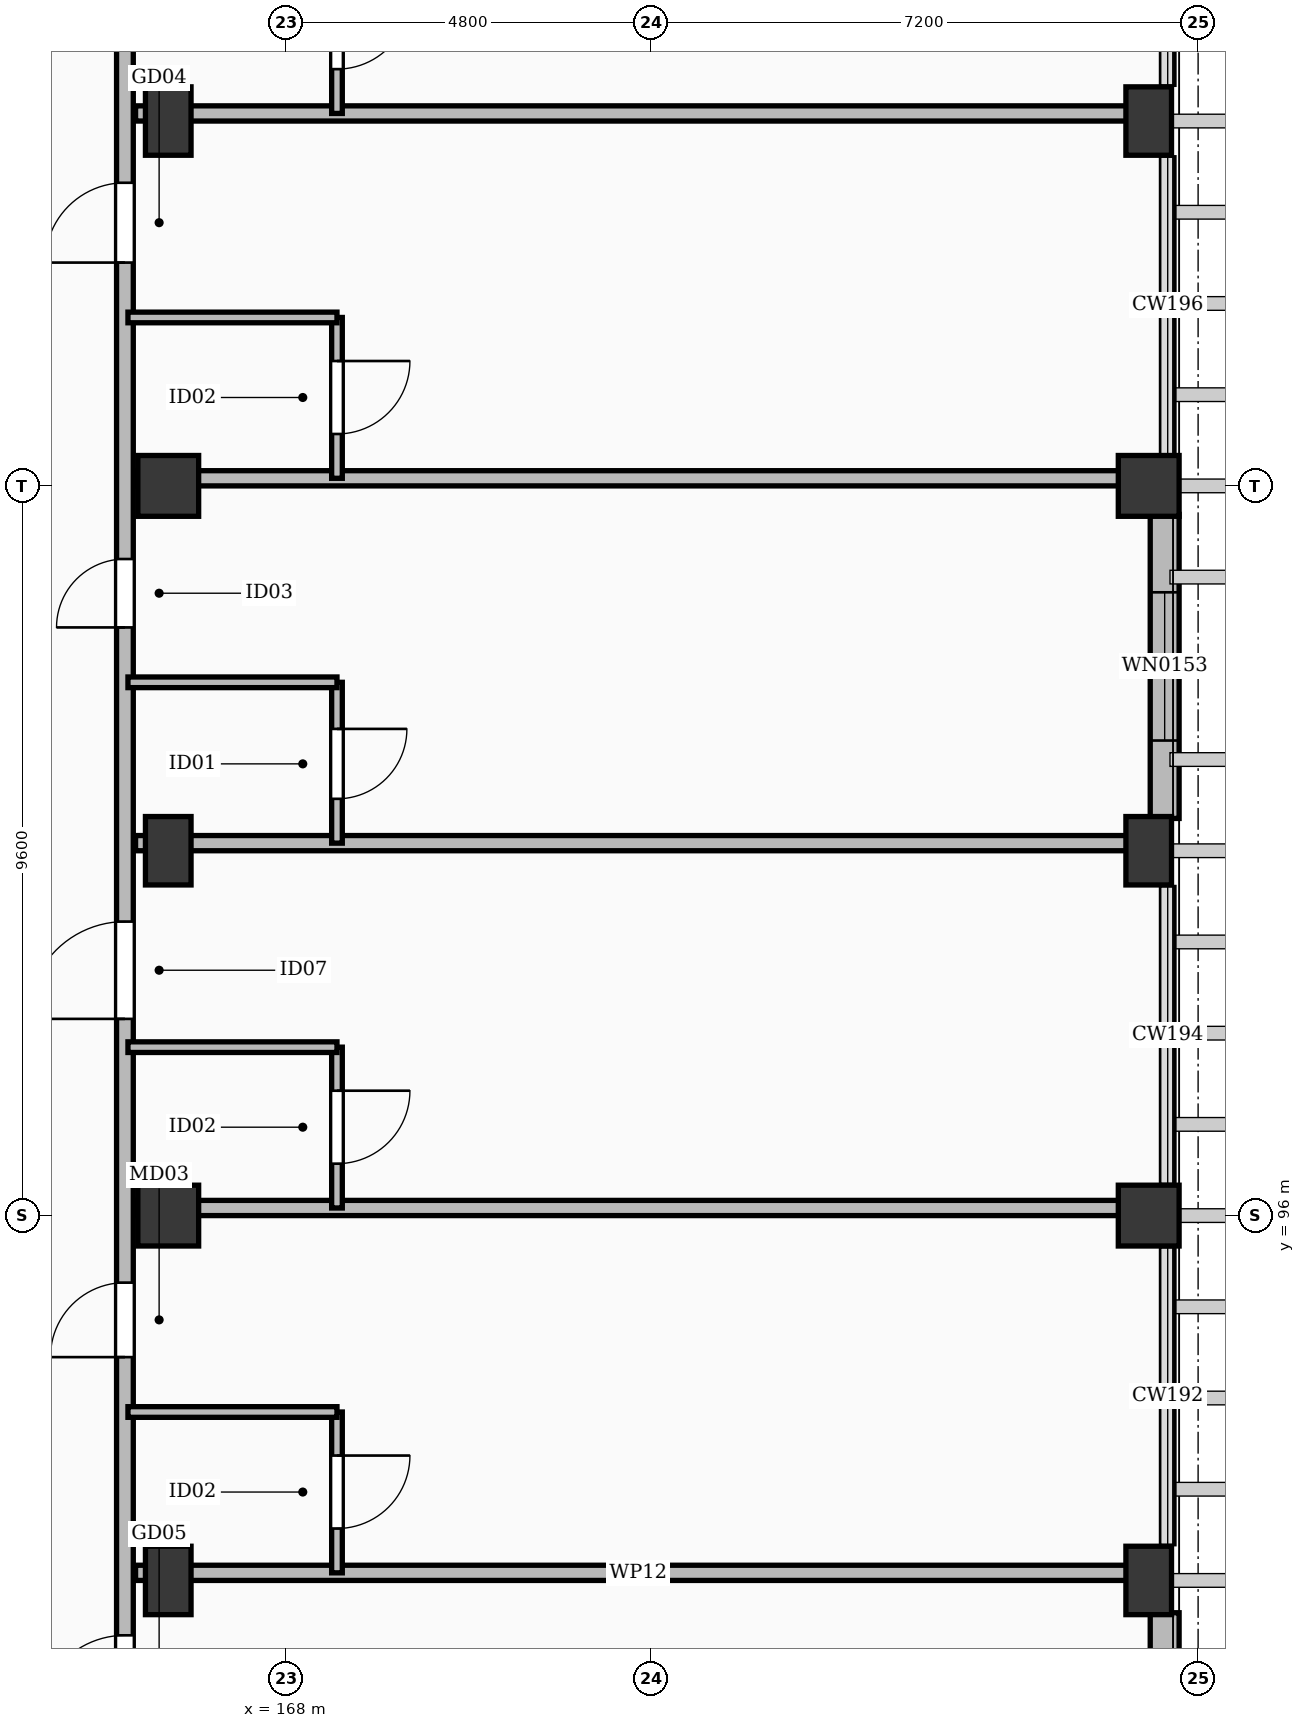
"""IFC4 building model, lengths in metres.
Left out: names, types, materials, properties, quantities, classifications, styles, units other than length and angle.
Written with IfcOpenShell. Run it as: python <this file> out.ifc"""

import sys

from ifc_helpers import new_model, si_unit, direction, frame, frame_2d, origin, origin_2d, place, context, subcontext, project, spatial, rectangle, extrude, element, fill, save


model = new_model("IFC4")
c1 = context("Model", 3, precision=1e-05, world=origin(), true_north=direction((0.0, 1.0)))
c2 = subcontext(c1, "Body", "Model", "MODEL_VIEW")
j1 = project(units=[si_unit("LENGTHUNIT", "METRE"), si_unit("PLANEANGLEUNIT", "RADIAN")], contexts=[c1])
p1 = place(None, origin())
s1 = spatial("IfcSite", under=j1, at=p1, CompositionType="ELEMENT")
p2 = place(p1, origin())
s2 = spatial("IfcBuilding", under=s1, at=p2, CompositionType="ELEMENT")
p3 = place(p2, frame((0.0, 0.0, 21.0)))
s3 = spatial("IfcBuildingStorey", under=s2, at=p3, CompositionType="ELEMENT", Elevation=21.0)
for number, where, z_axis, x_axis in (
    (1, (166.45, 96.0, 0.0), (0.0, 0.0, 1.0), (1.0, 0.0, 0.0)),
    (2, (166.45, 105.6, 0.0), (0.0, 0.0, 1.0), (1.0, 0.0, 0.0)),
    (3, (179.35, 96.0, 0.0), (0.0, 0.0, 1.0), (1.0, 0.0, 0.0)),
    (4, (179.35, 105.6, 0.0), (0.0, 0.0, 1.0), (1.0, 0.0, 0.0)),
):
    element("IfcColumn", number, at=place(p3, frame(where, z_axis=z_axis, x_axis=x_axis)), inside=s3, PredefinedType="COLUMN", context=c2, shape_type="SweptSolid", body=[
        extrude(rectangle(XDim=0.8, YDim=0.8, at=origin_2d()), origin(), (0.0, 0.0, 1.0), 3.6),
    ])
for number, where, z_axis, x_axis in (
    (5, (166.45, 91.2, -0.26), (0.0, 0.0, 1.0), (1.0, 0.0, 0.0)),
    (6, (166.45, 100.8, -0.26), (0.0, 0.0, 1.0), (1.0, 0.0, 0.0)),
    (7, (166.45, 110.4, -0.26), (0.0, 0.0, 1.0), (1.0, 0.0, 0.0)),
    (8, (179.35, 91.2, -0.26), (0.0, 0.0, 1.0), (1.0, 0.0, 0.0)),
    (9, (179.35, 100.8, -0.26), (0.0, 0.0, 1.0), (1.0, 0.0, 0.0)),
    (10, (179.35, 110.4, -0.26), (0.0, 0.0, 1.0), (1.0, 0.0, 0.0)),
):
    element("IfcColumn", number, at=place(p3, frame(where, z_axis=z_axis, x_axis=x_axis)), inside=s3, PredefinedType="COLUMN", context=c2, shape_type="SweptSolid", body=[
        extrude(rectangle(XDim=0.6, YDim=0.9, at=origin_2d()), origin(), (0.0, 0.0, 1.0), 3.86),
    ])
p4 = place(p3, frame((179.56, 90.775, 0.0), z_axis=(0.0, 0.0, 1.0), x_axis=(0.0, -1.0, 0.0)))
e11 = element("IfcWall", 11, at=p4, inside=s3, PredefinedType="SOLIDWALL", context=c2, shape_type="SweptSolid", body=[
    extrude(rectangle(XDim=4.0, YDim=0.38, at=frame_2d((2.0, 0.0))), origin(), (0.0, 0.0, 1.0), 2.582),
])
p5 = place(p4, frame((0.8, 0.0, 0.55)))
e12 = element("IfcOpeningElement", 12, at=p5, cuts=e11, PredefinedType="OPENING", context=c2, shape_type="SweptSolid", body=[
    extrude(rectangle(XDim=2.4, YDim=1.8, at=frame_2d((1.2, 0.9))), frame((0.0, 0.202, 0.0), z_axis=(0.0, -1.0, 0.0), x_axis=(1.0, 0.0, 0.0)), (0.0, 0.0, 1.0), 0.404),
])
p6 = place(p3, frame((179.56, 105.225, 0.0), z_axis=(0.0, 0.0, 1.0), x_axis=(0.0, -1.0, 0.0)))
e13 = element("IfcWall", 13, at=p6, inside=s3, PredefinedType="SOLIDWALL", context=c2, shape_type="SweptSolid", body=[
    extrude(rectangle(XDim=4.0, YDim=0.38, at=frame_2d((2.0, 0.0))), origin(), (0.0, 0.0, 1.0), 2.582),
])
p7 = place(p6, frame((1.025, 0.0, 0.55)))
e14 = element("IfcOpeningElement", 14, at=p7, cuts=e13, PredefinedType="OPENING", context=c2, shape_type="SweptSolid", body=[
    extrude(rectangle(XDim=1.95, YDim=1.77, at=frame_2d((0.975, 0.885))), frame((0.0, 0.202, 0.0), z_axis=(0.0, -1.0, 0.0), x_axis=(1.0, 0.0, 0.0)), (0.0, 0.0, 1.0), 0.404),
])
p8 = place(p3, frame((165.88, 65.4, 0.0), z_axis=(0.0, 0.0, 1.0), x_axis=(0.0, 1.0, 0.0)))
e15 = element("IfcWall", 15, at=p8, inside=s3, PredefinedType="PARTITIONING", context=c2, shape_type="SweptSolid", body=[
    extrude(rectangle(XDim=60.25, YDim=0.22, at=frame_2d((30.125, 0.0))), origin(), (0.0, 0.0, 1.0), 2.582),
])
p9 = place(p8, frame((4.388, 0.0, 0.0)))
e16 = element("IfcOpeningElement", 16, at=p9, cuts=e15, PredefinedType="OPENING", context=c2, shape_type="SweptSolid", body=[
    extrude(rectangle(XDim=1.28, YDim=2.16, at=frame_2d((0.64, 1.08))), frame((0.0, 0.122, 0.0), z_axis=(0.0, -1.0, 0.0), x_axis=(1.0, 0.0, 0.0)), (0.0, 0.0, 1.0), 0.244),
])
p10 = place(p8, frame((9.538, 0.0, 0.0)))
e17 = element("IfcOpeningElement", 17, at=p10, cuts=e15, PredefinedType="OPENING", context=c2, shape_type="SweptSolid", body=[
    extrude(rectangle(XDim=0.9, YDim=2.08, at=frame_2d((0.45, 1.04))), frame((0.0, 0.122, 0.0), z_axis=(0.0, -1.0, 0.0), x_axis=(1.0, 0.0, 0.0)), (0.0, 0.0, 1.0), 0.244),
])
p11 = place(p8, frame((14.338, 0.0, 0.0)))
e18 = element("IfcOpeningElement", 18, at=p11, cuts=e15, PredefinedType="OPENING", context=c2, shape_type="SweptSolid", body=[
    extrude(rectangle(XDim=1.05, YDim=2.22, at=frame_2d((0.525, 1.11))), frame((0.0, 0.122, 0.0), z_axis=(0.0, -1.0, 0.0), x_axis=(1.0, 0.0, 0.0)), (0.0, 0.0, 1.0), 0.244),
])
p12 = place(p8, frame((19.138, 0.0, 0.0)))
e19 = element("IfcOpeningElement", 19, at=p12, cuts=e15, PredefinedType="OPENING", context=c2, shape_type="SweptSolid", body=[
    extrude(rectangle(XDim=1.02, YDim=2.2, at=frame_2d((0.51, 1.1))), frame((0.0, 0.122, 0.0), z_axis=(0.0, -1.0, 0.0), x_axis=(1.0, 0.0, 0.0)), (0.0, 0.0, 1.0), 0.244),
])
p13 = place(p8, frame((23.938, 0.0, 0.0)))
e20 = element("IfcOpeningElement", 20, at=p13, cuts=e15, PredefinedType="OPENING", context=c2, shape_type="SweptSolid", body=[
    extrude(rectangle(XDim=1.14, YDim=2.26, at=frame_2d((0.57, 1.13))), frame((0.0, 0.122, 0.0), z_axis=(0.0, -1.0, 0.0), x_axis=(1.0, 0.0, 0.0)), (0.0, 0.0, 1.0), 0.244),
])
p14 = place(p8, frame((28.738, 0.0, 0.0)))
e21 = element("IfcOpeningElement", 21, at=p14, cuts=e15, PredefinedType="OPENING", context=c2, shape_type="SweptSolid", body=[
    extrude(rectangle(XDim=0.98, YDim=2.15, at=frame_2d((0.49, 1.075))), frame((0.0, 0.122, 0.0), z_axis=(0.0, -1.0, 0.0), x_axis=(1.0, 0.0, 0.0)), (0.0, 0.0, 1.0), 0.244),
])
p15 = place(p8, frame((33.188, 0.0, 0.0)))
e22 = element("IfcOpeningElement", 22, at=p15, cuts=e15, PredefinedType="OPENING", context=c2, shape_type="SweptSolid", body=[
    extrude(rectangle(XDim=1.28, YDim=2.16, at=frame_2d((0.64, 1.08))), frame((0.0, 0.122, 0.0), z_axis=(0.0, -1.0, 0.0), x_axis=(1.0, 0.0, 0.0)), (0.0, 0.0, 1.0), 0.244),
])
p16 = place(p8, frame((38.338, 0.0, 0.0)))
e23 = element("IfcOpeningElement", 23, at=p16, cuts=e15, PredefinedType="OPENING", context=c2, shape_type="SweptSolid", body=[
    extrude(rectangle(XDim=0.9, YDim=2.08, at=frame_2d((0.45, 1.04))), frame((0.0, 0.122, 0.0), z_axis=(0.0, -1.0, 0.0), x_axis=(1.0, 0.0, 0.0)), (0.0, 0.0, 1.0), 0.244),
])
p17 = place(p8, frame((43.138, 0.0, 0.0)))
e24 = element("IfcOpeningElement", 24, at=p17, cuts=e15, PredefinedType="OPENING", context=c2, shape_type="SweptSolid", body=[
    extrude(rectangle(XDim=1.05, YDim=2.22, at=frame_2d((0.525, 1.11))), frame((0.0, 0.122, 0.0), z_axis=(0.0, -1.0, 0.0), x_axis=(1.0, 0.0, 0.0)), (0.0, 0.0, 1.0), 0.244),
])
p18 = place(p8, frame((47.938, 0.0, 0.0)))
e25 = element("IfcOpeningElement", 25, at=p18, cuts=e15, PredefinedType="OPENING", context=c2, shape_type="SweptSolid", body=[
    extrude(rectangle(XDim=1.02, YDim=2.2, at=frame_2d((0.51, 1.1))), frame((0.0, 0.122, 0.0), z_axis=(0.0, -1.0, 0.0), x_axis=(1.0, 0.0, 0.0)), (0.0, 0.0, 1.0), 0.244),
])
p19 = place(p8, frame((52.738, 0.0, 0.0)))
e26 = element("IfcOpeningElement", 26, at=p19, cuts=e15, PredefinedType="OPENING", context=c2, shape_type="SweptSolid", body=[
    extrude(rectangle(XDim=1.14, YDim=2.26, at=frame_2d((0.57, 1.13))), frame((0.0, 0.122, 0.0), z_axis=(0.0, -1.0, 0.0), x_axis=(1.0, 0.0, 0.0)), (0.0, 0.0, 1.0), 0.244),
])
p20 = place(p8, frame((57.538, 0.0, 0.0)))
e27 = element("IfcOpeningElement", 27, at=p20, cuts=e15, PredefinedType="OPENING", context=c2, shape_type="SweptSolid", body=[
    extrude(rectangle(XDim=0.98, YDim=2.15, at=frame_2d((0.49, 1.075))), frame((0.0, 0.122, 0.0), z_axis=(0.0, -1.0, 0.0), x_axis=(1.0, 0.0, 0.0)), (0.0, 0.0, 1.0), 0.244),
])
p21 = place(p3, frame((166.02, 91.3, 0.0), z_axis=(0.0, 0.0, 1.0), x_axis=(1.0, 0.0, 0.0)))
e28 = element("IfcWall", 28, at=p21, inside=s3, PredefinedType="PARTITIONING", context=c2, shape_type="SweptSolid", body=[
    extrude(rectangle(XDim=13.23, YDim=0.2, at=frame_2d((6.615, 0.0))), origin(), (0.0, 0.0, 1.0), 2.582),
])
p22 = place(p3, frame((168.67, 91.3, 0.0), z_axis=(0.0, 0.0, 1.0), x_axis=(0.0, 1.0, 0.0)))
e29 = element("IfcWall", 29, at=p22, inside=s3, PredefinedType="PARTITIONING", context=c2, shape_type="SweptSolid", body=[
    extrude(rectangle(XDim=2.116, YDim=0.14, at=frame_2d((1.058, 0.0))), origin(), (0.0, 0.0, 1.0), 2.652),
])
p23 = place(p22, frame((0.583, 0.0, 0.0)))
e30 = element("IfcOpeningElement", 30, at=p23, cuts=e29, PredefinedType="OPENING", context=c2, shape_type="SweptSolid", body=[
    extrude(rectangle(XDim=0.96, YDim=2.12, at=frame_2d((0.48, 1.06))), frame((0.0, 0.082, 0.0), z_axis=(0.0, -1.0, 0.0), x_axis=(1.0, 0.0, 0.0)), (0.0, 0.0, 1.0), 0.164),
])
p24 = place(p3, frame((165.92, 93.416, 0.0), z_axis=(0.0, 0.0, 1.0), x_axis=(1.0, 0.0, 0.0)))
e31 = element("IfcWall", 31, at=p24, inside=s3, PredefinedType="PARTITIONING", context=c2, shape_type="SweptSolid", body=[
    extrude(rectangle(XDim=2.75, YDim=0.14, at=frame_2d((1.375, 0.0))), origin(), (0.0, 0.0, 1.0), 2.652),
])
p25 = place(p3, frame((166.02, 96.1, 0.0), z_axis=(0.0, 0.0, 1.0), x_axis=(1.0, 0.0, 0.0)))
e32 = element("IfcWall", 32, at=p25, inside=s3, PredefinedType="PARTITIONING", context=c2, shape_type="SweptSolid", body=[
    extrude(rectangle(XDim=13.23, YDim=0.2, at=frame_2d((6.615, 0.0))), origin(), (0.0, 0.0, 1.0), 2.582),
])
p26 = place(p3, frame((168.67, 96.1, 0.0), z_axis=(0.0, 0.0, 1.0), x_axis=(0.0, 1.0, 0.0)))
e33 = element("IfcWall", 33, at=p26, inside=s3, PredefinedType="PARTITIONING", context=c2, shape_type="SweptSolid", body=[
    extrude(rectangle(XDim=2.116, YDim=0.14, at=frame_2d((1.058, 0.0))), origin(), (0.0, 0.0, 1.0), 2.652),
])
p27 = place(p26, frame((0.583, 0.0, 0.0)))
e34 = element("IfcOpeningElement", 34, at=p27, cuts=e33, PredefinedType="OPENING", context=c2, shape_type="SweptSolid", body=[
    extrude(rectangle(XDim=0.96, YDim=2.12, at=frame_2d((0.48, 1.06))), frame((0.0, 0.082, 0.0), z_axis=(0.0, -1.0, 0.0), x_axis=(1.0, 0.0, 0.0)), (0.0, 0.0, 1.0), 0.164),
])
p28 = place(p3, frame((165.92, 98.216, 0.0), z_axis=(0.0, 0.0, 1.0), x_axis=(1.0, 0.0, 0.0)))
e35 = element("IfcWall", 35, at=p28, inside=s3, PredefinedType="PARTITIONING", context=c2, shape_type="SweptSolid", body=[
    extrude(rectangle(XDim=2.75, YDim=0.14, at=frame_2d((1.375, 0.0))), origin(), (0.0, 0.0, 1.0), 2.652),
])
p29 = place(p3, frame((166.02, 100.9, 0.0), z_axis=(0.0, 0.0, 1.0), x_axis=(1.0, 0.0, 0.0)))
e36 = element("IfcWall", 36, at=p29, inside=s3, PredefinedType="PARTITIONING", context=c2, shape_type="SweptSolid", body=[
    extrude(rectangle(XDim=13.23, YDim=0.2, at=frame_2d((6.615, 0.0))), origin(), (0.0, 0.0, 1.0), 2.582),
])
p30 = place(p3, frame((168.67, 100.9, 0.0), z_axis=(0.0, 0.0, 1.0), x_axis=(0.0, 1.0, 0.0)))
e37 = element("IfcWall", 37, at=p30, inside=s3, PredefinedType="PARTITIONING", context=c2, shape_type="SweptSolid", body=[
    extrude(rectangle(XDim=2.116, YDim=0.14, at=frame_2d((1.058, 0.0))), origin(), (0.0, 0.0, 1.0), 2.652),
])
p31 = place(p30, frame((0.583, 0.0, 0.0)))
e38 = element("IfcOpeningElement", 38, at=p31, cuts=e37, PredefinedType="OPENING", context=c2, shape_type="SweptSolid", body=[
    extrude(rectangle(XDim=0.92, YDim=2.1, at=frame_2d((0.46, 1.05))), frame((0.0, 0.082, 0.0), z_axis=(0.0, -1.0, 0.0), x_axis=(1.0, 0.0, 0.0)), (0.0, 0.0, 1.0), 0.164),
])
p32 = place(p3, frame((165.92, 103.016, 0.0), z_axis=(0.0, 0.0, 1.0), x_axis=(1.0, 0.0, 0.0)))
e39 = element("IfcWall", 39, at=p32, inside=s3, PredefinedType="PARTITIONING", context=c2, shape_type="SweptSolid", body=[
    extrude(rectangle(XDim=2.75, YDim=0.14, at=frame_2d((1.375, 0.0))), origin(), (0.0, 0.0, 1.0), 2.652),
])
p33 = place(p3, frame((166.02, 105.7, 0.0), z_axis=(0.0, 0.0, 1.0), x_axis=(1.0, 0.0, 0.0)))
e40 = element("IfcWall", 40, at=p33, inside=s3, PredefinedType="PARTITIONING", context=c2, shape_type="SweptSolid", body=[
    extrude(rectangle(XDim=13.23, YDim=0.2, at=frame_2d((6.615, 0.0))), origin(), (0.0, 0.0, 1.0), 2.582),
])
p34 = place(p3, frame((168.67, 105.7, 0.0), z_axis=(0.0, 0.0, 1.0), x_axis=(0.0, 1.0, 0.0)))
e41 = element("IfcWall", 41, at=p34, inside=s3, PredefinedType="PARTITIONING", context=c2, shape_type="SweptSolid", body=[
    extrude(rectangle(XDim=2.116, YDim=0.14, at=frame_2d((1.058, 0.0))), origin(), (0.0, 0.0, 1.0), 2.652),
])
p35 = place(p34, frame((0.583, 0.0, 0.0)))
e42 = element("IfcOpeningElement", 42, at=p35, cuts=e41, PredefinedType="OPENING", context=c2, shape_type="SweptSolid", body=[
    extrude(rectangle(XDim=0.96, YDim=2.12, at=frame_2d((0.48, 1.06))), frame((0.0, 0.082, 0.0), z_axis=(0.0, -1.0, 0.0), x_axis=(1.0, 0.0, 0.0)), (0.0, 0.0, 1.0), 0.164),
])
p36 = place(p3, frame((165.92, 107.816, 0.0), z_axis=(0.0, 0.0, 1.0), x_axis=(1.0, 0.0, 0.0)))
e43 = element("IfcWall", 43, at=p36, inside=s3, PredefinedType="PARTITIONING", context=c2, shape_type="SweptSolid", body=[
    extrude(rectangle(XDim=2.75, YDim=0.14, at=frame_2d((1.375, 0.0))), origin(), (0.0, 0.0, 1.0), 2.652),
])
p37 = place(p3, frame((166.02, 110.5, 0.0), z_axis=(0.0, 0.0, 1.0), x_axis=(1.0, 0.0, 0.0)))
e44 = element("IfcWall", 44, at=p37, inside=s3, PredefinedType="PARTITIONING", context=c2, shape_type="SweptSolid", body=[
    extrude(rectangle(XDim=13.23, YDim=0.2, at=frame_2d((6.615, 0.0))), origin(), (0.0, 0.0, 1.0), 2.582),
])
p38 = place(p3, frame((168.67, 110.5, 0.0), z_axis=(0.0, 0.0, 1.0), x_axis=(0.0, 1.0, 0.0)))
e45 = element("IfcWall", 45, at=p38, inside=s3, PredefinedType="PARTITIONING", context=c2, shape_type="SweptSolid", body=[
    extrude(rectangle(XDim=2.116, YDim=0.14, at=frame_2d((1.058, 0.0))), origin(), (0.0, 0.0, 1.0), 2.652),
])
p39 = place(p38, frame((0.583, 0.0, 0.0)))
e46 = element("IfcOpeningElement", 46, at=p39, cuts=e45, PredefinedType="OPENING", context=c2, shape_type="SweptSolid", body=[
    extrude(rectangle(XDim=0.96, YDim=2.12, at=frame_2d((0.48, 1.06))), frame((0.0, 0.082, 0.0), z_axis=(0.0, -1.0, 0.0), x_axis=(1.0, 0.0, 0.0)), (0.0, 0.0, 1.0), 0.164),
])
p40 = place(p7, origin())
e47 = element("IfcWindow", 47, at=p40, inside=s3, PartitioningType="SINGLE_PANEL", PredefinedType="WINDOW", context=c2, shape_type="SweptSolid", body=[
    extrude(rectangle(XDim=1.95, YDim=1.77, at=frame_2d((0.975, 0.885))), frame((0.0, 0.03, 0.0), z_axis=(0.0, -1.0, 0.0), x_axis=(1.0, 0.0, 0.0)), (0.0, 0.0, 1.0), 0.06),
])
fill(e14, e47)
p41 = place(p13, origin())
e48 = element("IfcDoor", 48, at=p41, inside=s3, OperationType="SINGLE_SWING_LEFT", PredefinedType="DOOR", context=c2, shape_type="SweptSolid", body=[
    extrude(rectangle(XDim=1.14, YDim=2.26, at=frame_2d((0.57, 1.13))), frame((0.0, 0.025, 0.0), z_axis=(0.0, -1.0, 0.0), x_axis=(1.0, 0.0, 0.0)), (0.0, 0.0, 1.0), 0.05),
])
fill(e20, e48)
p42 = place(p14, origin())
e49 = element("IfcDoor", 49, at=p42, inside=s3, OperationType="SINGLE_SWING_LEFT", PredefinedType="DOOR", context=c2, shape_type="SweptSolid", body=[
    extrude(rectangle(XDim=0.98, YDim=2.15, at=frame_2d((0.49, 1.075))), frame((0.0, 0.025, 0.0), z_axis=(0.0, -1.0, 0.0), x_axis=(1.0, 0.0, 0.0)), (0.0, 0.0, 1.0), 0.05),
])
fill(e21, e49)
p43 = place(p23, frame((0.96, 0.0, 0.0), z_axis=(0.0, 0.0, 1.0), x_axis=(-1.0, 0.0, 0.0)))
e50 = element("IfcDoor", 50, at=p43, inside=s3, OperationType="SINGLE_SWING_RIGHT", PredefinedType="DOOR", context=c2, shape_type="SweptSolid", body=[
    extrude(rectangle(XDim=0.96, YDim=2.12, at=frame_2d((0.48, 1.06))), frame((0.0, 0.025, 0.0), z_axis=(0.0, -1.0, 0.0), x_axis=(1.0, 0.0, 0.0)), (0.0, 0.0, 1.0), 0.05),
])
fill(e30, e50)
p44 = place(p15, origin())
e51 = element("IfcDoor", 51, at=p44, inside=s3, OperationType="SINGLE_SWING_LEFT", PredefinedType="DOOR", context=c2, shape_type="SweptSolid", body=[
    extrude(rectangle(XDim=1.28, YDim=2.16, at=frame_2d((0.64, 1.08))), frame((0.0, 0.025, 0.0), z_axis=(0.0, -1.0, 0.0), x_axis=(1.0, 0.0, 0.0)), (0.0, 0.0, 1.0), 0.05),
])
fill(e22, e51)
p45 = place(p27, frame((0.96, 0.0, 0.0), z_axis=(0.0, 0.0, 1.0), x_axis=(-1.0, 0.0, 0.0)))
e52 = element("IfcDoor", 52, at=p45, inside=s3, OperationType="SINGLE_SWING_RIGHT", PredefinedType="DOOR", context=c2, shape_type="SweptSolid", body=[
    extrude(rectangle(XDim=0.96, YDim=2.12, at=frame_2d((0.48, 1.06))), frame((0.0, 0.025, 0.0), z_axis=(0.0, -1.0, 0.0), x_axis=(1.0, 0.0, 0.0)), (0.0, 0.0, 1.0), 0.05),
])
fill(e34, e52)
p46 = place(p16, origin())
e53 = element("IfcDoor", 53, at=p46, inside=s3, OperationType="SINGLE_SWING_LEFT", PredefinedType="DOOR", context=c2, shape_type="SweptSolid", body=[
    extrude(rectangle(XDim=0.9, YDim=2.08, at=frame_2d((0.45, 1.04))), frame((0.0, 0.025, 0.0), z_axis=(0.0, -1.0, 0.0), x_axis=(1.0, 0.0, 0.0)), (0.0, 0.0, 1.0), 0.05),
])
fill(e23, e53)
p47 = place(p31, frame((0.92, 0.0, 0.0), z_axis=(0.0, 0.0, 1.0), x_axis=(-1.0, 0.0, 0.0)))
e54 = element("IfcDoor", 54, at=p47, inside=s3, OperationType="SINGLE_SWING_RIGHT", PredefinedType="DOOR", context=c2, shape_type="SweptSolid", body=[
    extrude(rectangle(XDim=0.92, YDim=2.1, at=frame_2d((0.46, 1.05))), frame((0.0, 0.025, 0.0), z_axis=(0.0, -1.0, 0.0), x_axis=(1.0, 0.0, 0.0)), (0.0, 0.0, 1.0), 0.05),
])
fill(e38, e54)
p48 = place(p17, origin())
e55 = element("IfcDoor", 55, at=p48, inside=s3, OperationType="SINGLE_SWING_LEFT", PredefinedType="DOOR", context=c2, shape_type="SweptSolid", body=[
    extrude(rectangle(XDim=1.05, YDim=2.22, at=frame_2d((0.525, 1.11))), frame((0.0, 0.025, 0.0), z_axis=(0.0, -1.0, 0.0), x_axis=(1.0, 0.0, 0.0)), (0.0, 0.0, 1.0), 0.05),
])
fill(e24, e55)
p49 = place(p35, frame((0.96, 0.0, 0.0), z_axis=(0.0, 0.0, 1.0), x_axis=(-1.0, 0.0, 0.0)))
e56 = element("IfcDoor", 56, at=p49, inside=s3, OperationType="SINGLE_SWING_RIGHT", PredefinedType="DOOR", context=c2, shape_type="SweptSolid", body=[
    extrude(rectangle(XDim=0.96, YDim=2.12, at=frame_2d((0.48, 1.06))), frame((0.0, 0.025, 0.0), z_axis=(0.0, -1.0, 0.0), x_axis=(1.0, 0.0, 0.0)), (0.0, 0.0, 1.0), 0.05),
])
fill(e42, e56)
p50 = place(p39, frame((0.96, 0.0, 0.0), z_axis=(0.0, 0.0, 1.0), x_axis=(-1.0, 0.0, 0.0)))
e57 = element("IfcDoor", 57, at=p50, inside=s3, OperationType="SINGLE_SWING_RIGHT", PredefinedType="DOOR", context=c2, shape_type="SweptSolid", body=[
    extrude(rectangle(XDim=0.96, YDim=2.12, at=frame_2d((0.48, 1.06))), frame((0.0, 0.025, 0.0), z_axis=(0.0, -1.0, 0.0), x_axis=(1.0, 0.0, 0.0)), (0.0, 0.0, 1.0), 0.05),
])
fill(e46, e57)
save(model, sys.argv[1])
